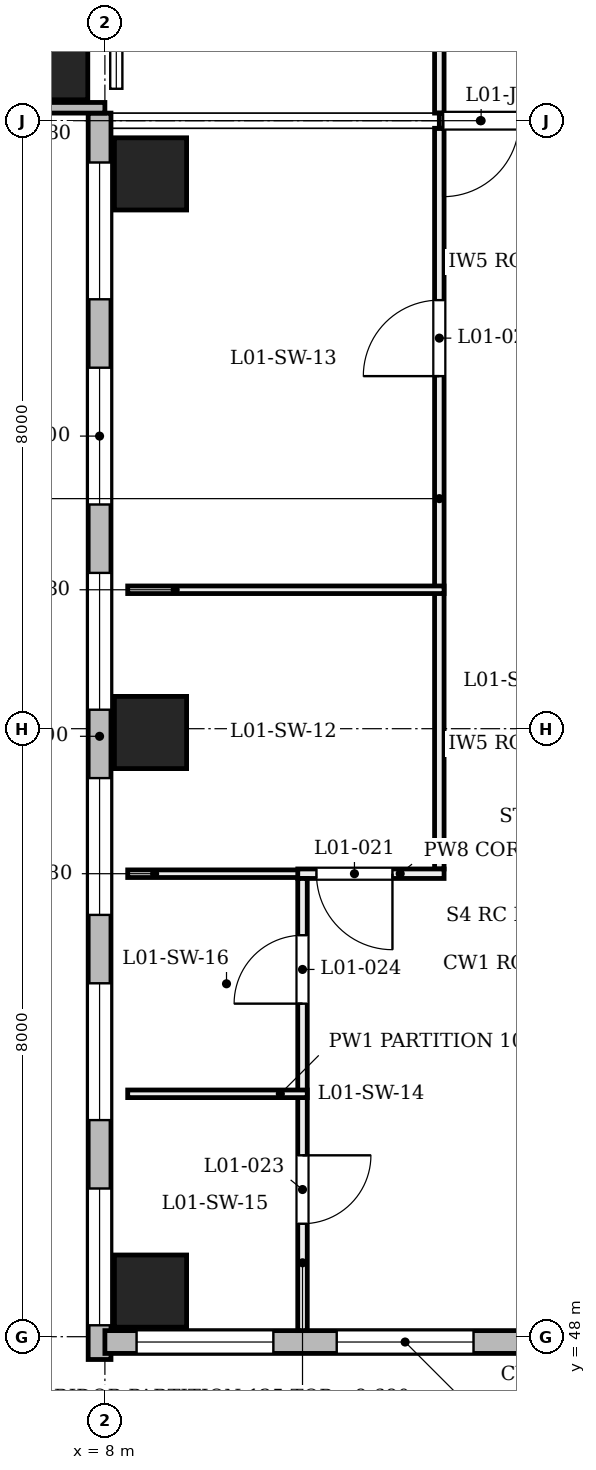
"""IFC4 building model, lengths in metres.
Left out: names, types, materials, properties, quantities, classifications, styles, units other than length and angle.
Written with IfcOpenShell. Run it as: python <this file> out.ifc"""

import sys

from ifc_helpers import new_model, si_unit, direction, frame, frame_2d, origin, origin_2d, place, context, subcontext, project, spatial, rectangle, extrude, element, fill, save


model = new_model("IFC4")
c1 = context("Model", 3, precision=1e-05, world=origin(), true_north=direction((0.0, 1.0)))
c2 = subcontext(c1, "Body", "Model", "MODEL_VIEW")
j1 = project(units=[si_unit("LENGTHUNIT", "METRE"), si_unit("PLANEANGLEUNIT", "RADIAN")], contexts=[c1])
p1 = place(None, origin())
s1 = spatial("IfcSite", under=j1, at=p1, CompositionType="ELEMENT")
p2 = place(p1, origin())
s2 = spatial("IfcBuilding", under=s1, at=p2, CompositionType="ELEMENT")
p3 = place(p2, frame((0.0, 0.0, 4.8)))
s3 = spatial("IfcBuildingStorey", under=s2, at=p3, CompositionType="ELEMENT", Elevation=4.8)
for number, where, z_axis, x_axis in (
    (1, (8.6, 48.6, 0.0), (0.0, 0.0, 1.0), (1.0, 0.0, 0.0)),
    (2, (8.6, 55.95, 0.0), (0.0, 0.0, 1.0), (1.0, 0.0, 0.0)),
    (3, (8.6, 63.3, 0.0), (0.0, 0.0, 1.0), (1.0, 0.0, 0.0)),
):
    element("IfcColumn", number, at=place(p3, frame(where, z_axis=z_axis, x_axis=x_axis)), inside=s3, PredefinedType="COLUMN", context=c2, shape_type="SweptSolid", body=[
        extrude(rectangle(XDim=0.95, YDim=0.95, at=origin_2d()), origin(), (0.0, 0.0, 1.0), 4.8),
    ])
p4 = place(p3, frame((7.6, 64.7, 0.0), z_axis=(-0.203952265704, 0.0, 0.978980833987), x_axis=(0.0, -1.0, 0.0)))
e4 = element("IfcColumn", 4, at=p4, inside=s3, PredefinedType="COLUMN", context=c2, shape_type="SweptSolid", body=[
    extrude(rectangle(XDim=0.85, YDim=0.85, at=origin_2d()), origin(), (0.0, 0.0, 1.0), 4.903),
])
p5 = place(p3, frame((7.93, 47.7, 0.0), z_axis=(0.0, 0.0, 1.0), x_axis=(0.0, 1.0, 0.0)))
e5 = element("IfcWall", 5, at=p5, inside=s3, PredefinedType="SOLIDWALL", context=c2, shape_type="SweptSolid", body=[
    extrude(rectangle(XDim=16.4, YDim=0.3, at=frame_2d((8.2, 0.0))), origin(), (0.0, 0.0, 1.0), 3.9),
])
p6 = place(p5, frame((0.45, 0.0, 0.75)))
e6 = element("IfcOpeningElement", 6, at=p6, cuts=e5, PredefinedType="OPENING", context=c2, shape_type="SweptSolid", body=[
    extrude(rectangle(XDim=1.8, YDim=3.1, at=frame_2d((0.9, 1.55))), frame((0.0, 0.16, 0.0), z_axis=(0.0, -1.0, 0.0), x_axis=(1.0, 0.0, 0.0)), (0.0, 0.0, 1.0), 0.32),
])
p7 = place(p5, frame((3.15, 0.0, 0.75)))
e7 = element("IfcOpeningElement", 7, at=p7, cuts=e5, PredefinedType="OPENING", context=c2, shape_type="SweptSolid", body=[
    extrude(rectangle(XDim=1.8, YDim=3.1, at=frame_2d((0.9, 1.55))), frame((0.0, 0.16, 0.0), z_axis=(0.0, -1.0, 0.0), x_axis=(1.0, 0.0, 0.0)), (0.0, 0.0, 1.0), 0.32),
])
p8 = place(p5, frame((5.85, 0.0, 0.75)))
e8 = element("IfcOpeningElement", 8, at=p8, cuts=e5, PredefinedType="OPENING", context=c2, shape_type="SweptSolid", body=[
    extrude(rectangle(XDim=1.8, YDim=3.1, at=frame_2d((0.9, 1.55))), frame((0.0, 0.16, 0.0), z_axis=(0.0, -1.0, 0.0), x_axis=(1.0, 0.0, 0.0)), (0.0, 0.0, 1.0), 0.32),
])
p9 = place(p5, frame((8.55, 0.0, 0.75)))
e9 = element("IfcOpeningElement", 9, at=p9, cuts=e5, PredefinedType="OPENING", context=c2, shape_type="SweptSolid", body=[
    extrude(rectangle(XDim=1.8, YDim=3.1, at=frame_2d((0.9, 1.55))), frame((0.0, 0.16, 0.0), z_axis=(0.0, -1.0, 0.0), x_axis=(1.0, 0.0, 0.0)), (0.0, 0.0, 1.0), 0.32),
])
p10 = place(p5, frame((11.25, 0.0, 0.75)))
e10 = element("IfcOpeningElement", 10, at=p10, cuts=e5, PredefinedType="OPENING", context=c2, shape_type="SweptSolid", body=[
    extrude(rectangle(XDim=1.8, YDim=3.1, at=frame_2d((0.9, 1.55))), frame((0.0, 0.16, 0.0), z_axis=(0.0, -1.0, 0.0), x_axis=(1.0, 0.0, 0.0)), (0.0, 0.0, 1.0), 0.32),
])
p11 = place(p5, frame((13.95, 0.0, 0.75)))
e11 = element("IfcOpeningElement", 11, at=p11, cuts=e5, PredefinedType="OPENING", context=c2, shape_type="SweptSolid", body=[
    extrude(rectangle(XDim=1.8, YDim=3.1, at=frame_2d((0.9, 1.55))), frame((0.0, 0.16, 0.0), z_axis=(0.0, -1.0, 0.0), x_axis=(1.0, 0.0, 0.0)), (0.0, 0.0, 1.0), 0.32),
])
p12 = place(p3, frame((8.0, 47.93, 0.0), z_axis=(0.0, 0.0, 1.0), x_axis=(1.0, 0.0, 0.0)))
e12 = element("IfcWall", 12, at=p12, inside=s3, PredefinedType="SOLIDWALL", context=c2, shape_type="SweptSolid", body=[
    extrude(rectangle(XDim=7.9, YDim=0.3, at=frame_2d((3.95, 0.0))), origin(), (0.0, 0.0, 1.0), 3.9),
])
p13 = place(p12, frame((0.417, 0.0, 0.75)))
e13 = element("IfcOpeningElement", 13, at=p13, cuts=e12, PredefinedType="OPENING", context=c2, shape_type="SweptSolid", body=[
    extrude(rectangle(XDim=1.8, YDim=3.1, at=frame_2d((0.9, 1.55))), frame((0.0, 0.16, 0.0), z_axis=(0.0, -1.0, 0.0), x_axis=(1.0, 0.0, 0.0)), (0.0, 0.0, 1.0), 0.32),
])
p14 = place(p12, frame((3.05, 0.0, 0.75)))
e14 = element("IfcOpeningElement", 14, at=p14, cuts=e12, PredefinedType="OPENING", context=c2, shape_type="SweptSolid", body=[
    extrude(rectangle(XDim=1.8, YDim=3.1, at=frame_2d((0.9, 1.55))), frame((0.0, 0.16, 0.0), z_axis=(0.0, -1.0, 0.0), x_axis=(1.0, 0.0, 0.0)), (0.0, 0.0, 1.0), 0.32),
])
p15 = place(p12, frame((5.683, 0.0, 0.75)))
e15 = element("IfcOpeningElement", 15, at=p15, cuts=e12, PredefinedType="OPENING", context=c2, shape_type="SweptSolid", body=[
    extrude(rectangle(XDim=1.8, YDim=3.1, at=frame_2d((0.9, 1.55))), frame((0.0, 0.16, 0.0), z_axis=(0.0, -1.0, 0.0), x_axis=(1.0, 0.0, 0.0)), (0.0, 0.0, 1.0), 0.32),
])
p16 = place(p3, frame((7.0, 64.17, 0.0), z_axis=(0.0, 0.0, 1.0), x_axis=(1.0, 0.0, 0.0)))
e16 = element("IfcWall", 16, at=p16, inside=s3, PredefinedType="SOLIDWALL", context=c2, shape_type="SweptSolid", body=[
    extrude(rectangle(XDim=1.0, YDim=0.14, at=frame_2d((0.5, 0.0))), origin(), (0.0, 0.0, 1.0), 3.9),
])
p17 = place(p3, frame((12.4, 54.154, 0.0), z_axis=(0.0, 0.0, 1.0), x_axis=(0.0, 1.0, 0.0)))
e17 = element("IfcWall", 17, at=p17, inside=s3, PredefinedType="PARTITIONING", context=c2, shape_type="SweptSolid", body=[
    extrude(rectangle(XDim=9.746, YDim=0.125, at=frame_2d((4.873, 0.0))), origin(), (0.0, 0.0, 1.0), 3.88),
])
p18 = place(p17, frame((6.485, 0.0, 0.0)))
e18 = element("IfcOpeningElement", 18, at=p18, cuts=e17, PredefinedType="OPENING", context=c2, shape_type="SweptSolid", body=[
    extrude(rectangle(XDim=1.0, YDim=2.1, at=frame_2d((0.5, 1.05))), frame((0.0, 0.073, 0.0), z_axis=(0.0, -1.0, 0.0), x_axis=(1.0, 0.0, 0.0)), (0.0, 0.0, 1.0), 0.145),
])
p19 = place(p3, frame((12.4, 64.1, 0.0), z_axis=(0.0, 0.0, 1.0), x_axis=(0.0, 1.0, 0.0)))
e19 = element("IfcWall", 19, at=p19, inside=s3, PredefinedType="PARTITIONING", context=c2, shape_type="SweptSolid", body=[
    extrude(rectangle(XDim=4.037, YDim=0.125, at=frame_2d((2.019, 0.0))), origin(), (0.0, 0.0, 1.0), 3.88),
])
p20 = place(p19, frame((1.825, 0.0, 0.0)))
e20 = element("IfcOpeningElement", 20, at=p20, cuts=e19, PredefinedType="OPENING", context=c2, shape_type="SweptSolid", body=[
    extrude(rectangle(XDim=1.0, YDim=2.1, at=frame_2d((0.5, 1.05))), frame((0.0, 0.073, 0.0), z_axis=(0.0, -1.0, 0.0), x_axis=(1.0, 0.0, 0.0)), (0.0, 0.0, 1.0), 0.145),
])
p21 = place(p3, frame((8.3, 54.092, 0.0), z_axis=(0.0, 0.0, 1.0), x_axis=(1.0, 0.0, 0.0)))
e21 = element("IfcWall", 21, at=p21, inside=s3, PredefinedType="PARTITIONING", context=c2, shape_type="SweptSolid", body=[
    extrude(rectangle(XDim=2.363, YDim=0.1, at=frame_2d((1.181, 0.0))), origin(), (0.0, 0.0, 1.0), 3.98),
])
p22 = place(p3, frame((10.538, 54.092, 0.0), z_axis=(0.0, 0.0, 1.0), x_axis=(1.0, 0.0, 0.0)))
e22 = element("IfcWall", 22, at=p22, inside=s3, PredefinedType="PARTITIONING", context=c2, shape_type="SweptSolid", body=[
    extrude(rectangle(XDim=1.925, YDim=0.125, at=frame_2d((0.962, 0.0))), origin(), (0.0, 0.0, 1.0), 4.56),
])
p23 = place(p22, frame((0.246, 0.0, 0.0)))
e23 = element("IfcOpeningElement", 23, at=p23, cuts=e22, PredefinedType="OPENING", context=c2, shape_type="SweptSolid", body=[
    extrude(rectangle(XDim=1.0, YDim=2.1, at=frame_2d((0.5, 1.05))), frame((0.0, 0.073, 0.0), z_axis=(0.0, -1.0, 0.0), x_axis=(1.0, 0.0, 0.0)), (0.0, 0.0, 1.0), 0.145),
])
p24 = place(p3, frame((8.3, 57.828, 0.0), z_axis=(0.0, 0.0, 1.0), x_axis=(1.0, 0.0, 0.0)))
e24 = element("IfcWall", 24, at=p24, inside=s3, PredefinedType="PARTITIONING", context=c2, shape_type="SweptSolid", body=[
    extrude(rectangle(XDim=4.162, YDim=0.1, at=frame_2d((2.081, 0.0))), origin(), (0.0, 0.0, 1.0), 3.98),
])
p25 = place(p3, frame((10.6, 48.08, 0.0), z_axis=(0.0, 0.0, 1.0), x_axis=(0.0, 1.0, 0.0)))
e25 = element("IfcWall", 25, at=p25, inside=s3, PredefinedType="PARTITIONING", context=c2, shape_type="SweptSolid", body=[
    extrude(rectangle(XDim=5.949, YDim=0.125, at=frame_2d((2.975, 0.0))), origin(), (0.0, 0.0, 1.0), 3.88),
])
p26 = place(p25, frame((1.406, 0.0, 0.0)))
e26 = element("IfcOpeningElement", 26, at=p26, cuts=e25, PredefinedType="OPENING", context=c2, shape_type="SweptSolid", body=[
    extrude(rectangle(XDim=0.9, YDim=2.1, at=frame_2d((0.45, 1.05))), frame((0.0, 0.073, 0.0), z_axis=(0.0, -1.0, 0.0), x_axis=(1.0, 0.0, 0.0)), (0.0, 0.0, 1.0), 0.145),
])
p27 = place(p25, frame((4.302, 0.0, 0.0)))
e27 = element("IfcOpeningElement", 27, at=p27, cuts=e25, PredefinedType="OPENING", context=c2, shape_type="SweptSolid", body=[
    extrude(rectangle(XDim=0.9, YDim=2.1, at=frame_2d((0.45, 1.05))), frame((0.0, 0.073, 0.0), z_axis=(0.0, -1.0, 0.0), x_axis=(1.0, 0.0, 0.0)), (0.0, 0.0, 1.0), 0.145),
])
p28 = place(p3, frame((8.3, 51.196, 0.0), z_axis=(0.0, 0.0, 1.0), x_axis=(1.0, 0.0, 0.0)))
e28 = element("IfcWall", 28, at=p28, inside=s3, PredefinedType="PARTITIONING", context=c2, shape_type="SweptSolid", body=[
    extrude(rectangle(XDim=2.363, YDim=0.1, at=frame_2d((1.181, 0.0))), origin(), (0.0, 0.0, 1.0), 3.98),
])
p29 = place(p3, frame((12.4, 64.0, 0.0), z_axis=(0.0, 0.0, 1.0), x_axis=(1.0, 0.0, 0.0)))
e29 = element("IfcWall", 29, at=p29, inside=s3, PredefinedType="PARTITIONING", context=c2, shape_type="SweptSolid", body=[
    extrude(rectangle(XDim=3.6, YDim=0.2, at=frame_2d((1.8, 0.0))), origin(), (0.0, 0.0, 1.0), 3.88),
])
p30 = place(p29, frame((0.05, 0.0, 0.0)))
e30 = element("IfcOpeningElement", 30, at=p30, cuts=e29, PredefinedType="OPENING", context=c2, shape_type="SweptSolid", body=[
    extrude(rectangle(XDim=1.0, YDim=2.1, at=frame_2d((0.5, 1.05))), frame((0.0, 0.11, 0.0), z_axis=(0.0, -1.0, 0.0), x_axis=(1.0, 0.0, 0.0)), (0.0, 0.0, 1.0), 0.22),
])
p31 = place(p6, origin())
e31 = element("IfcWindow", 31, at=p31, inside=s3, PartitioningType="SINGLE_PANEL", PredefinedType="WINDOW", context=c2, shape_type="SweptSolid", body=[
    extrude(rectangle(XDim=1.8, YDim=3.1, at=frame_2d((0.9, 1.55))), frame((0.0, 0.03, 0.0), z_axis=(0.0, -1.0, 0.0), x_axis=(1.0, 0.0, 0.0)), (0.0, 0.0, 1.0), 0.06),
])
fill(e6, e31)
p32 = place(p7, origin())
e32 = element("IfcWindow", 32, at=p32, inside=s3, PartitioningType="SINGLE_PANEL", PredefinedType="WINDOW", context=c2, shape_type="SweptSolid", body=[
    extrude(rectangle(XDim=1.8, YDim=3.1, at=frame_2d((0.9, 1.55))), frame((0.0, 0.03, 0.0), z_axis=(0.0, -1.0, 0.0), x_axis=(1.0, 0.0, 0.0)), (0.0, 0.0, 1.0), 0.06),
])
fill(e7, e32)
p33 = place(p8, origin())
e33 = element("IfcWindow", 33, at=p33, inside=s3, PartitioningType="SINGLE_PANEL", PredefinedType="WINDOW", context=c2, shape_type="SweptSolid", body=[
    extrude(rectangle(XDim=1.8, YDim=3.1, at=frame_2d((0.9, 1.55))), frame((0.0, 0.03, 0.0), z_axis=(0.0, -1.0, 0.0), x_axis=(1.0, 0.0, 0.0)), (0.0, 0.0, 1.0), 0.06),
])
fill(e8, e33)
p34 = place(p9, origin())
e34 = element("IfcWindow", 34, at=p34, inside=s3, PartitioningType="SINGLE_PANEL", PredefinedType="WINDOW", context=c2, shape_type="SweptSolid", body=[
    extrude(rectangle(XDim=1.8, YDim=3.1, at=frame_2d((0.9, 1.55))), frame((0.0, 0.03, 0.0), z_axis=(0.0, -1.0, 0.0), x_axis=(1.0, 0.0, 0.0)), (0.0, 0.0, 1.0), 0.06),
])
fill(e9, e34)
p35 = place(p10, origin())
e35 = element("IfcWindow", 35, at=p35, inside=s3, PartitioningType="SINGLE_PANEL", PredefinedType="WINDOW", context=c2, shape_type="SweptSolid", body=[
    extrude(rectangle(XDim=1.8, YDim=3.1, at=frame_2d((0.9, 1.55))), frame((0.0, 0.03, 0.0), z_axis=(0.0, -1.0, 0.0), x_axis=(1.0, 0.0, 0.0)), (0.0, 0.0, 1.0), 0.06),
])
fill(e10, e35)
p36 = place(p11, origin())
e36 = element("IfcWindow", 36, at=p36, inside=s3, PartitioningType="SINGLE_PANEL", PredefinedType="WINDOW", context=c2, shape_type="SweptSolid", body=[
    extrude(rectangle(XDim=1.8, YDim=3.1, at=frame_2d((0.9, 1.55))), frame((0.0, 0.03, 0.0), z_axis=(0.0, -1.0, 0.0), x_axis=(1.0, 0.0, 0.0)), (0.0, 0.0, 1.0), 0.06),
])
fill(e11, e36)
p37 = place(p13, origin())
e37 = element("IfcWindow", 37, at=p37, inside=s3, PartitioningType="SINGLE_PANEL", PredefinedType="WINDOW", context=c2, shape_type="SweptSolid", body=[
    extrude(rectangle(XDim=1.8, YDim=3.1, at=frame_2d((0.9, 1.55))), frame((0.0, 0.03, 0.0), z_axis=(0.0, -1.0, 0.0), x_axis=(1.0, 0.0, 0.0)), (0.0, 0.0, 1.0), 0.06),
])
fill(e13, e37)
p38 = place(p14, origin())
e38 = element("IfcWindow", 38, at=p38, inside=s3, PartitioningType="SINGLE_PANEL", PredefinedType="WINDOW", context=c2, shape_type="SweptSolid", body=[
    extrude(rectangle(XDim=1.8, YDim=3.1, at=frame_2d((0.9, 1.55))), frame((0.0, 0.03, 0.0), z_axis=(0.0, -1.0, 0.0), x_axis=(1.0, 0.0, 0.0)), (0.0, 0.0, 1.0), 0.06),
])
fill(e14, e38)
p39 = place(p23, origin())
e39 = element("IfcDoor", 39, at=p39, inside=s3, OperationType="SINGLE_SWING_RIGHT", PredefinedType="DOOR", context=c2, shape_type="SweptSolid", body=[
    extrude(rectangle(XDim=1.0, YDim=2.1, at=frame_2d((0.5, 1.05))), frame((0.0, 0.025, 0.0), z_axis=(0.0, -1.0, 0.0), x_axis=(1.0, 0.0, 0.0)), (0.0, 0.0, 1.0), 0.05),
])
fill(e23, e39)
p40 = place(p18, origin())
e40 = element("IfcDoor", 40, at=p40, inside=s3, OperationType="SINGLE_SWING_LEFT", PredefinedType="DOOR", context=c2, shape_type="SweptSolid", body=[
    extrude(rectangle(XDim=1.0, YDim=2.1, at=frame_2d((0.5, 1.05))), frame((0.0, 0.025, 0.0), z_axis=(0.0, -1.0, 0.0), x_axis=(1.0, 0.0, 0.0)), (0.0, 0.0, 1.0), 0.05),
])
fill(e18, e40)
p41 = place(p26, origin())
e41 = element("IfcDoor", 41, at=p41, inside=s3, OperationType="SINGLE_SWING_RIGHT", PredefinedType="DOOR", context=c2, shape_type="SweptSolid", body=[
    extrude(rectangle(XDim=0.9, YDim=2.1, at=frame_2d((0.45, 1.05))), frame((0.0, 0.025, 0.0), z_axis=(0.0, -1.0, 0.0), x_axis=(1.0, 0.0, 0.0)), (0.0, 0.0, 1.0), 0.05),
])
fill(e26, e41)
p42 = place(p27, origin())
e42 = element("IfcDoor", 42, at=p42, inside=s3, OperationType="SINGLE_SWING_LEFT", PredefinedType="DOOR", context=c2, shape_type="SweptSolid", body=[
    extrude(rectangle(XDim=0.9, YDim=2.1, at=frame_2d((0.45, 1.05))), frame((0.0, 0.025, 0.0), z_axis=(0.0, -1.0, 0.0), x_axis=(1.0, 0.0, 0.0)), (0.0, 0.0, 1.0), 0.05),
])
fill(e27, e42)
p43 = place(p30, frame((1.0, 0.0, 0.0), z_axis=(0.0, 0.0, 1.0), x_axis=(-1.0, 0.0, 0.0)))
e43 = element("IfcDoor", 43, at=p43, inside=s3, OperationType="SINGLE_SWING_LEFT", PredefinedType="DOOR", context=c2, shape_type="SweptSolid", body=[
    extrude(rectangle(XDim=1.0, YDim=2.1, at=frame_2d((0.5, 1.05))), frame((0.0, 0.025, 0.0), z_axis=(0.0, -1.0, 0.0), x_axis=(1.0, 0.0, 0.0)), (0.0, 0.0, 1.0), 0.05),
])
fill(e30, e43)
save(model, sys.argv[1])
